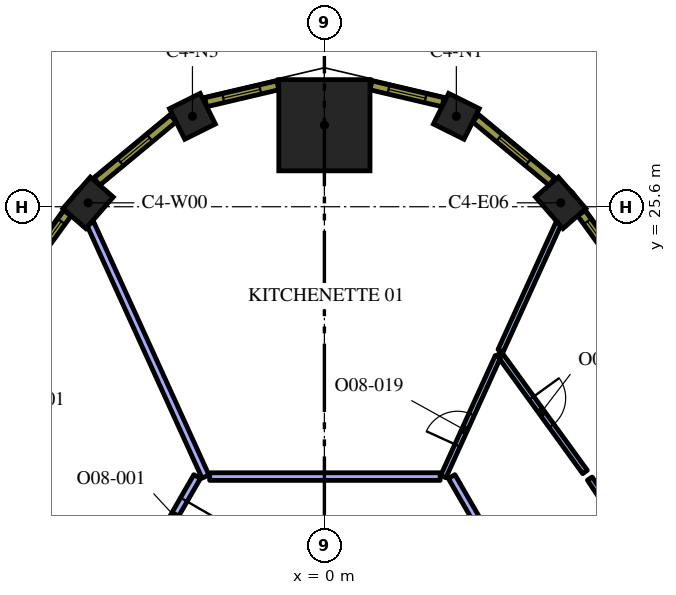
"""IFC4 building model, lengths in metres.
Left out: names, types, materials, properties, quantities, classifications, styles, units other than length and angle.
Written with IfcOpenShell. Run it as: python <this file> out.ifc"""

import sys

from ifc_helpers import new_model, si_unit, direction, frame, frame_2d, origin, origin_2d, place, context, subcontext, project, spatial, rectangle, extrude, element, fill, save


model = new_model("IFC4")
c1 = context("Model", 3, precision=1e-05, world=origin(), true_north=direction((0.0, 1.0)))
c2 = subcontext(c1, "Body", "Model", "MODEL_VIEW")
j1 = project(units=[si_unit("LENGTHUNIT", "METRE"), si_unit("PLANEANGLEUNIT", "RADIAN")], contexts=[c1])
p1 = place(None, origin())
s1 = spatial("IfcSite", under=j1, at=p1, CompositionType="ELEMENT")
p2 = place(p1, origin())
s2 = spatial("IfcBuilding", under=s1, at=p2, CompositionType="ELEMENT")
p3 = place(p2, frame((0.0, 0.0, 231.0)))
s3 = spatial("IfcBuildingStorey", under=s2, at=p3, CompositionType="ELEMENT", Elevation=231.0)
p4 = place(p3, frame((0.0, 27.744, 0.0), z_axis=(0.0, 0.0, 1.0), x_axis=(0.0, 1.0, 0.0)))
e1 = element("IfcColumn", 1, at=p4, inside=s3, PredefinedType="COLUMN", context=c2, shape_type="SweptSolid", body=[
    extrude(rectangle(XDim=2.4, YDim=2.4, at=origin_2d()), origin(), (0.0, 0.0, 1.0), 4.2),
])
p5 = place(p3, frame((6.219, 25.703, 0.0), z_axis=(0.0, 0.0, 1.0), x_axis=(-0.657250291216, 0.753672378886, 0.0)))
e2 = element("IfcColumn", 2, at=p5, inside=s3, PredefinedType="COLUMN", context=c2, shape_type="SweptSolid", body=[
    extrude(rectangle(XDim=1.1, YDim=0.8, at=origin_2d()), origin(), (0.0, 0.0, 1.0), 4.2),
])
for number, where, z_axis, x_axis in (
    (3, (3.472, 27.979, 0.0), (0.0, 0.0, 1.0), (-0.895, 0.445, 0.0)),
    (4, (-3.472, 27.979, 0.0), (0.0, 0.0, 1.0), (-0.895, -0.445, 0.0)),
):
    element("IfcColumn", number, at=place(p3, frame(where, z_axis=z_axis, x_axis=x_axis)), inside=s3, PredefinedType="COLUMN", context=c2, shape_type="SweptSolid", body=[
        extrude(rectangle(XDim=0.9, YDim=0.9, at=origin_2d()), origin(), (0.0, 0.0, 1.0), 4.2),
    ])
p6 = place(p3, frame((-6.219, 25.703, 0.0), z_axis=(0.0, 0.0, 1.0), x_axis=(-0.657250291216, -0.753672378886, 0.0)))
e5 = element("IfcColumn", 5, at=p6, inside=s3, PredefinedType="COLUMN", context=c2, shape_type="SweptSolid", body=[
    extrude(rectangle(XDim=1.1, YDim=0.8, at=origin_2d()), origin(), (0.0, 0.0, 1.0), 4.2),
])
p7 = place(p3, frame((-7.011, 15.156, 0.0), z_axis=(0.0, 0.0, 1.0), x_axis=(-0.866015917575, 0.500016430238, 0.0)))
e6 = element("IfcWall", 6, at=p7, inside=s3, PredefinedType="PARTITIONING", context=c2, shape_type="SweptSolid", body=[
    extrude(rectangle(XDim=5.607, YDim=0.2, at=frame_2d((2.804, 0.0))), origin(), (0.0, 0.0, 1.0), 3.45),
])
p8 = place(p3, frame((-6.161, 25.16, 0.0), z_axis=(0.0, 0.0, 1.0), x_axis=(0.414315639321, -0.910133260031, 0.0)))
e7 = element("IfcWall", 7, at=p8, inside=s3, PredefinedType="PARTITIONING", context=c2, shape_type="SweptSolid", body=[
    extrude(rectangle(XDim=7.318, YDim=0.2, at=frame_2d((3.659, 0.0))), origin(), (0.0, 0.0, 1.0), 3.45),
])
p9 = place(p3, frame((-3.349, 18.5, 0.0), z_axis=(0.0, 0.0, 1.0), x_axis=(-0.499980886083, -0.866036438928, 0.0)))
e8 = element("IfcWall", 8, at=p9, inside=s3, PredefinedType="PARTITIONING", context=c2, shape_type="SweptSolid", body=[
    extrude(rectangle(XDim=2.317, YDim=0.2, at=frame_2d((1.158, 0.0))), origin(), (0.0, 0.0, 1.0), 3.45),
])
p10 = place(p9, frame((0.7, 0.0, 0.0)))
e9 = element("IfcOpeningElement", 9, at=p10, cuts=e8, PredefinedType="OPENING", context=c2, shape_type="SweptSolid", body=[
    extrude(rectangle(XDim=1.0, YDim=2.1, at=frame_2d((0.5, 1.05))), frame((0.0, 0.11, 0.0), z_axis=(0.0, -1.0, 0.0), x_axis=(1.0, 0.0, 0.0)), (0.0, 0.0, 1.0), 0.22),
])
p11 = place(p3, frame((8.529, 16.118, 0.0), z_axis=(0.0, 0.0, 1.0), x_axis=(-0.552884246744, 0.833258069089, 0.0)))
e10 = element("IfcWall", 10, at=p11, inside=s3, PredefinedType="PARTITIONING", context=c2, shape_type="SweptSolid", body=[
    extrude(rectangle(XDim=2.794, YDim=0.15, at=frame_2d((1.397, 0.0))), origin(), (0.0, 0.0, 1.0), 3.45),
])
p12 = place(p3, frame((4.601, 21.733, 0.0), z_axis=(0.0, 0.0, 1.0), x_axis=(0.587031033917, -0.809564429319, 0.0)))
e11 = element("IfcWall", 11, at=p12, inside=s3, PredefinedType="PARTITIONING", context=c2, shape_type="SweptSolid", body=[
    extrude(rectangle(XDim=3.845, YDim=0.15, at=frame_2d((1.923, 0.0))), origin(), (0.0, 0.0, 1.0), 3.45),
])
p13 = place(p12, frame((1.445, 0.0, 0.0)))
e12 = element("IfcOpeningElement", 12, at=p13, cuts=e11, PredefinedType="OPENING", context=c2, shape_type="SweptSolid", body=[
    extrude(rectangle(XDim=0.9, YDim=2.1, at=frame_2d((0.45, 1.05))), frame((0.0, 0.085, 0.0), z_axis=(0.0, -1.0, 0.0), x_axis=(1.0, 0.0, 0.0)), (0.0, 0.0, 1.0), 0.17),
])
p14 = place(p3, frame((4.636, 21.812, 0.0), z_axis=(0.0, 0.0, 1.0), x_axis=(0.414322811892, 0.910129994861, 0.0)))
e13 = element("IfcWall", 13, at=p14, inside=s3, PredefinedType="PARTITIONING", context=c2, shape_type="SweptSolid", body=[
    extrude(rectangle(XDim=3.679, YDim=0.15, at=frame_2d((1.84, 0.0))), origin(), (0.0, 0.0, 1.0), 3.45),
])
p15 = place(p3, frame((3.129, 18.5, 0.0), z_axis=(0.0, 0.0, 1.0), x_axis=(0.414291096557, 0.910144432117, 0.0)))
e14 = element("IfcWall", 14, at=p15, inside=s3, PredefinedType="PARTITIONING", context=c2, shape_type="SweptSolid", body=[
    extrude(rectangle(XDim=3.466, YDim=0.15, at=frame_2d((1.733, 0.0))), origin(), (0.0, 0.0, 1.0), 3.45),
])
p16 = place(p15, frame((0.9, 0.0, 0.0)))
e15 = element("IfcOpeningElement", 15, at=p16, cuts=e14, PredefinedType="OPENING", context=c2, shape_type="SweptSolid", body=[
    extrude(rectangle(XDim=0.9, YDim=2.1, at=frame_2d((0.45, 1.05))), frame((0.0, 0.085, 0.0), z_axis=(0.0, -1.0, 0.0), x_axis=(1.0, 0.0, 0.0)), (0.0, 0.0, 1.0), 0.17),
])
p17 = place(p3, frame((8.257, 9.998, 0.0), z_axis=(0.0, 0.0, 1.0), x_axis=(-0.499987955211, 0.866032357735, 0.0)))
e16 = element("IfcWall", 16, at=p17, inside=s3, PredefinedType="PARTITIONING", context=c2, shape_type="SweptSolid", body=[
    extrude(rectangle(XDim=9.817, YDim=0.2, at=frame_2d((4.909, 0.0))), origin(), (0.0, 0.0, 1.0), 3.45),
])
p18 = place(p17, frame((4.4, 0.0, 0.0)))
e17 = element("IfcOpeningElement", 17, at=p18, cuts=e16, PredefinedType="OPENING", context=c2, shape_type="SweptSolid", body=[
    extrude(rectangle(XDim=1.0, YDim=2.1, at=frame_2d((0.5, 1.05))), frame((0.0, 0.11, 0.0), z_axis=(0.0, -1.0, 0.0), x_axis=(1.0, 0.0, 0.0)), (0.0, 0.0, 1.0), 0.22),
])
p19 = place(p3, frame((3.046, 18.5, 0.0), z_axis=(0.0, 0.0, 1.0), x_axis=(-1.0, 0.0, 0.0)))
e18 = element("IfcWall", 18, at=p19, inside=s3, PredefinedType="PARTITIONING", context=c2, shape_type="SweptSolid", body=[
    extrude(rectangle(XDim=6.065, YDim=0.2, at=frame_2d((3.033, 0.0))), origin(), (0.0, 0.0, 1.0), 3.45),
])
p20 = place(p3, frame((9.878, 21.132, 0.0), z_axis=(0.0, 0.0, 1.0), x_axis=(-0.586998456641, 0.80958805074, 0.0)))
e19 = element("IfcWall", 19, at=p20, inside=s3, PredefinedType="SOLIDWALL", context=c2, shape_type="SweptSolid", body=[
    extrude(rectangle(XDim=5.311, YDim=0.24, at=frame_2d((2.655, 0.0))), origin(), (0.0, 0.0, 1.0), 3.95),
])
p21 = place(p20, frame((0.306, 0.0, 0.9)))
e20 = element("IfcOpeningElement", 20, at=p21, cuts=e19, PredefinedType="OPENING", context=c2, shape_type="SweptSolid", body=[
    extrude(rectangle(XDim=1.5, YDim=2.55, at=frame_2d((0.75, 1.275))), frame((0.0, 0.13, 0.0), z_axis=(0.0, -1.0, 0.0), x_axis=(1.0, 0.0, 0.0)), (0.0, 0.0, 1.0), 0.26),
])
p22 = place(p20, frame((3.539, 0.0, 0.9)))
e21 = element("IfcOpeningElement", 21, at=p22, cuts=e19, PredefinedType="OPENING", context=c2, shape_type="SweptSolid", body=[
    extrude(rectangle(XDim=1.5, YDim=2.55, at=frame_2d((0.75, 1.275))), frame((0.0, 0.13, 0.0), z_axis=(0.0, -1.0, 0.0), x_axis=(1.0, 0.0, 0.0)), (0.0, 0.0, 1.0), 0.26),
])
p23 = place(p3, frame((5.987, 26.259, 0.0), z_axis=(0.0, 0.0, 1.0), x_axis=(-0.769990037733, 0.638055908045, 0.0)))
e22 = element("IfcWall", 22, at=p23, inside=s3, PredefinedType="SOLIDWALL", context=c2, shape_type="SweptSolid", body=[
    extrude(rectangle(XDim=2.609, YDim=0.24, at=frame_2d((1.305, 0.0))), origin(), (0.0, 0.0, 1.0), 3.95),
])
p24 = place(p23, frame((0.805, 0.0, 0.9)))
e23 = element("IfcOpeningElement", 23, at=p24, cuts=e22, PredefinedType="OPENING", context=c2, shape_type="SweptSolid", body=[
    extrude(rectangle(XDim=1.0, YDim=2.55, at=frame_2d((0.5, 1.275))), frame((0.0, 0.13, 0.0), z_axis=(0.0, -1.0, 0.0), x_axis=(1.0, 0.0, 0.0)), (0.0, 0.0, 1.0), 0.26),
])
p25 = place(p3, frame((3.123, 28.349, 0.0), z_axis=(0.0, 0.0, 1.0), x_axis=(-0.973515706272, 0.228620142686, 0.0)))
e24 = element("IfcWall", 24, at=p25, inside=s3, PredefinedType="SOLIDWALL", context=c2, shape_type="SweptSolid", body=[
    extrude(rectangle(XDim=1.948, YDim=0.24, at=frame_2d((0.974, 0.0))), origin(), (0.0, 0.0, 1.0), 3.95),
])
p26 = place(p25, frame((0.474, 0.0, 0.9)))
e25 = element("IfcOpeningElement", 25, at=p26, cuts=e24, PredefinedType="OPENING", context=c2, shape_type="SweptSolid", body=[
    extrude(rectangle(XDim=1.0, YDim=2.55, at=frame_2d((0.5, 1.275))), frame((0.0, 0.13, 0.0), z_axis=(0.0, -1.0, 0.0), x_axis=(1.0, 0.0, 0.0)), (0.0, 0.0, 1.0), 0.26),
])
p27 = place(p3, frame((-1.227, 28.794, 0.0), z_axis=(0.0, 0.0, 1.0), x_axis=(-0.973515706272, -0.228620142686, 0.0)))
e26 = element("IfcWall", 26, at=p27, inside=s3, PredefinedType="SOLIDWALL", context=c2, shape_type="SweptSolid", body=[
    extrude(rectangle(XDim=1.948, YDim=0.24, at=frame_2d((0.974, 0.0))), origin(), (0.0, 0.0, 1.0), 3.95),
])
p28 = place(p27, frame((0.474, 0.0, 0.9)))
e27 = element("IfcOpeningElement", 27, at=p28, cuts=e26, PredefinedType="OPENING", context=c2, shape_type="SweptSolid", body=[
    extrude(rectangle(XDim=1.0, YDim=2.55, at=frame_2d((0.5, 1.275))), frame((0.0, 0.13, 0.0), z_axis=(0.0, -1.0, 0.0), x_axis=(1.0, 0.0, 0.0)), (0.0, 0.0, 1.0), 0.26),
])
p29 = place(p3, frame((-3.978, 27.924, 0.0), z_axis=(0.0, 0.0, 1.0), x_axis=(-0.769990037733, -0.638055908045, 0.0)))
e28 = element("IfcWall", 28, at=p29, inside=s3, PredefinedType="SOLIDWALL", context=c2, shape_type="SweptSolid", body=[
    extrude(rectangle(XDim=2.609, YDim=0.24, at=frame_2d((1.305, 0.0))), origin(), (0.0, 0.0, 1.0), 3.95),
])
p30 = place(p29, frame((0.805, 0.0, 0.9)))
e29 = element("IfcOpeningElement", 29, at=p30, cuts=e28, PredefinedType="OPENING", context=c2, shape_type="SweptSolid", body=[
    extrude(rectangle(XDim=1.0, YDim=2.55, at=frame_2d((0.5, 1.275))), frame((0.0, 0.13, 0.0), z_axis=(0.0, -1.0, 0.0), x_axis=(1.0, 0.0, 0.0)), (0.0, 0.0, 1.0), 0.26),
])
p31 = place(p3, frame((-6.761, 25.432, 0.0), z_axis=(0.0, 0.0, 1.0), x_axis=(-0.586998456641, -0.80958805074, 0.0)))
e30 = element("IfcWall", 30, at=p31, inside=s3, PredefinedType="SOLIDWALL", context=c2, shape_type="SweptSolid", body=[
    extrude(rectangle(XDim=5.311, YDim=0.24, at=frame_2d((2.655, 0.0))), origin(), (0.0, 0.0, 1.0), 3.95),
])
p32 = place(p31, frame((0.271, 0.0, 0.9)))
e31 = element("IfcOpeningElement", 31, at=p32, cuts=e30, PredefinedType="OPENING", context=c2, shape_type="SweptSolid", body=[
    extrude(rectangle(XDim=1.5, YDim=2.55, at=frame_2d((0.75, 1.275))), frame((0.0, 0.13, 0.0), z_axis=(0.0, -1.0, 0.0), x_axis=(1.0, 0.0, 0.0)), (0.0, 0.0, 1.0), 0.26),
])
p33 = place(p31, frame((3.504, 0.0, 0.9)))
e32 = element("IfcOpeningElement", 32, at=p33, cuts=e30, PredefinedType="OPENING", context=c2, shape_type="SweptSolid", body=[
    extrude(rectangle(XDim=1.5, YDim=2.55, at=frame_2d((0.75, 1.275))), frame((0.0, 0.13, 0.0), z_axis=(0.0, -1.0, 0.0), x_axis=(1.0, 0.0, 0.0)), (0.0, 0.0, 1.0), 0.26),
])
p34 = place(p10, origin())
e33 = element("IfcDoor", 33, at=p34, inside=s3, OperationType="SINGLE_SWING_RIGHT", PredefinedType="DOOR", context=c2, shape_type="SweptSolid", body=[
    extrude(rectangle(XDim=1.0, YDim=2.1, at=frame_2d((0.5, 1.05))), frame((0.0, 0.025, 0.0), z_axis=(0.0, -1.0, 0.0), x_axis=(1.0, 0.0, 0.0)), (0.0, 0.0, 1.0), 0.05),
])
fill(e9, e33)
p35 = place(p13, origin())
e34 = element("IfcDoor", 34, at=p35, inside=s3, OperationType="SINGLE_SWING_LEFT", PredefinedType="DOOR", context=c2, shape_type="SweptSolid", body=[
    extrude(rectangle(XDim=0.9, YDim=2.1, at=frame_2d((0.45, 1.05))), frame((0.0, 0.025, 0.0), z_axis=(0.0, -1.0, 0.0), x_axis=(1.0, 0.0, 0.0)), (0.0, 0.0, 1.0), 0.05),
])
fill(e12, e34)
p36 = place(p16, origin())
e35 = element("IfcDoor", 35, at=p36, inside=s3, OperationType="SINGLE_SWING_LEFT", PredefinedType="DOOR", context=c2, shape_type="SweptSolid", body=[
    extrude(rectangle(XDim=0.9, YDim=2.1, at=frame_2d((0.45, 1.05))), frame((0.0, 0.025, 0.0), z_axis=(0.0, -1.0, 0.0), x_axis=(1.0, 0.0, 0.0)), (0.0, 0.0, 1.0), 0.05),
])
fill(e15, e35)
p37 = place(p22, origin())
e36 = element("IfcWindow", 36, at=p37, inside=s3, PartitioningType="SINGLE_PANEL", PredefinedType="WINDOW", context=c2, shape_type="SweptSolid", body=[
    extrude(rectangle(XDim=1.5, YDim=2.55, at=frame_2d((0.75, 1.275))), frame((0.0, 0.04, 0.0), z_axis=(0.0, -1.0, 0.0), x_axis=(1.0, 0.0, 0.0)), (0.0, 0.0, 1.0), 0.06),
])
fill(e21, e36)
p38 = place(p24, origin())
e37 = element("IfcWindow", 37, at=p38, inside=s3, PartitioningType="SINGLE_PANEL", PredefinedType="WINDOW", context=c2, shape_type="SweptSolid", body=[
    extrude(rectangle(XDim=1.0, YDim=2.55, at=frame_2d((0.5, 1.275))), frame((0.0, 0.04, 0.0), z_axis=(0.0, -1.0, 0.0), x_axis=(1.0, 0.0, 0.0)), (0.0, 0.0, 1.0), 0.06),
])
fill(e23, e37)
p39 = place(p26, origin())
e38 = element("IfcWindow", 38, at=p39, inside=s3, PartitioningType="SINGLE_PANEL", PredefinedType="WINDOW", context=c2, shape_type="SweptSolid", body=[
    extrude(rectangle(XDim=1.0, YDim=2.55, at=frame_2d((0.5, 1.275))), frame((0.0, 0.04, 0.0), z_axis=(0.0, -1.0, 0.0), x_axis=(1.0, 0.0, 0.0)), (0.0, 0.0, 1.0), 0.06),
])
fill(e25, e38)
p40 = place(p28, origin())
e39 = element("IfcWindow", 39, at=p40, inside=s3, PartitioningType="SINGLE_PANEL", PredefinedType="WINDOW", context=c2, shape_type="SweptSolid", body=[
    extrude(rectangle(XDim=1.0, YDim=2.55, at=frame_2d((0.5, 1.275))), frame((0.0, 0.04, 0.0), z_axis=(0.0, -1.0, 0.0), x_axis=(1.0, 0.0, 0.0)), (0.0, 0.0, 1.0), 0.06),
])
fill(e27, e39)
p41 = place(p30, origin())
e40 = element("IfcWindow", 40, at=p41, inside=s3, PartitioningType="SINGLE_PANEL", PredefinedType="WINDOW", context=c2, shape_type="SweptSolid", body=[
    extrude(rectangle(XDim=1.0, YDim=2.55, at=frame_2d((0.5, 1.275))), frame((0.0, 0.04, 0.0), z_axis=(0.0, -1.0, 0.0), x_axis=(1.0, 0.0, 0.0)), (0.0, 0.0, 1.0), 0.06),
])
fill(e29, e40)
p42 = place(p32, origin())
e41 = element("IfcWindow", 41, at=p42, inside=s3, PartitioningType="SINGLE_PANEL", PredefinedType="WINDOW", context=c2, shape_type="SweptSolid", body=[
    extrude(rectangle(XDim=1.5, YDim=2.55, at=frame_2d((0.75, 1.275))), frame((0.0, 0.04, 0.0), z_axis=(0.0, -1.0, 0.0), x_axis=(1.0, 0.0, 0.0)), (0.0, 0.0, 1.0), 0.06),
])
fill(e31, e41)
save(model, sys.argv[1])
